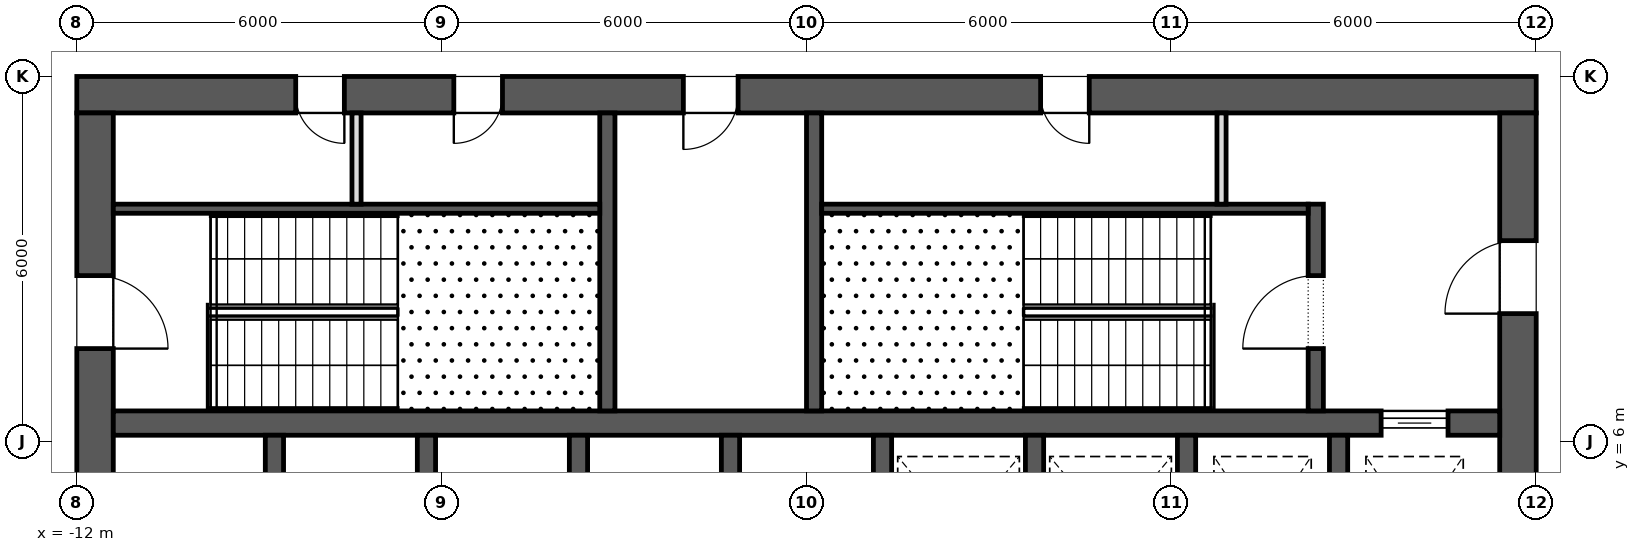
"""IFC4 building model, lengths in metres.
Left out: names, types, materials, properties, quantities, classifications, styles, units other than length and angle.
Written with IfcOpenShell. Run it as: python <this file> out.ifc"""

import sys

from ifc_helpers import new_model, si_unit, direction, frame, frame_2d, origin, place, context, subcontext, project, spatial, rectangle, extrude, element, fill, save


model = new_model("IFC4")
c1 = context("Model", 3, precision=1e-05, world=origin(), true_north=direction((0.0, 1.0)))
c2 = subcontext(c1, "Body", "Model", "MODEL_VIEW")
j1 = project(units=[si_unit("LENGTHUNIT", "METRE"), si_unit("PLANEANGLEUNIT", "RADIAN")], contexts=[c1])
p1 = place(None, origin())
s1 = spatial("IfcSite", under=j1, at=p1, CompositionType="ELEMENT")
p2 = place(p1, origin())
s2 = spatial("IfcBuilding", under=s1, at=p2, CompositionType="ELEMENT")
p3 = place(p2, frame((0.0, 0.0, 73.9)))
s3 = spatial("IfcBuildingStorey", under=s2, at=p3, CompositionType="ELEMENT", Elevation=73.9)
p4 = place(p3, frame((-12.0, 11.7, 0.0), z_axis=(0.0, 0.0, 1.0), x_axis=(1.0, 0.0, 0.0)))
e1 = element("IfcWall", 1, at=p4, inside=s3, PredefinedType="SHEAR", context=c2, shape_type="SweptSolid", body=[
    extrude(rectangle(XDim=24.0, YDim=0.6, at=frame_2d((12.0, 0.0))), origin(), (0.0, 0.0, 1.0), 4.2),
])
p5 = place(p4, frame((9.975, 0.0, 0.0)))
e2 = element("IfcOpeningElement", 2, at=p5, cuts=e1, PredefinedType="OPENING", context=c2, shape_type="SweptSolid", body=[
    extrude(rectangle(XDim=0.9, YDim=2.1, at=frame_2d((0.45, 1.05))), frame((0.0, 0.312, 0.0), z_axis=(0.0, -1.0, 0.0), x_axis=(1.0, 0.0, 0.0)), (0.0, 0.0, 1.0), 0.624),
])
p6 = place(p4, frame((3.6, 0.0, 0.0)))
e3 = element("IfcOpeningElement", 3, at=p6, cuts=e1, PredefinedType="OPENING", context=c2, shape_type="SweptSolid", body=[
    extrude(rectangle(XDim=0.8, YDim=2.1, at=frame_2d((0.4, 1.05))), frame((0.0, 0.312, 0.0), z_axis=(0.0, -1.0, 0.0), x_axis=(1.0, 0.0, 0.0)), (0.0, 0.0, 1.0), 0.624),
])
p7 = place(p4, frame((6.2, 0.0, 0.0)))
e4 = element("IfcOpeningElement", 4, at=p7, cuts=e1, PredefinedType="OPENING", context=c2, shape_type="SweptSolid", body=[
    extrude(rectangle(XDim=0.8, YDim=2.1, at=frame_2d((0.4, 1.05))), frame((0.0, 0.312, 0.0), z_axis=(0.0, -1.0, 0.0), x_axis=(1.0, 0.0, 0.0)), (0.0, 0.0, 1.0), 0.624),
])
p8 = place(p4, frame((15.85, 0.0, 0.0)))
e5 = element("IfcOpeningElement", 5, at=p8, cuts=e1, PredefinedType="OPENING", context=c2, shape_type="SweptSolid", body=[
    extrude(rectangle(XDim=0.8, YDim=2.1, at=frame_2d((0.4, 1.05))), frame((0.0, 0.312, 0.0), z_axis=(0.0, -1.0, 0.0), x_axis=(1.0, 0.0, 0.0)), (0.0, 0.0, 1.0), 0.624),
])
p9 = place(p3, frame((11.7, -11.4, 0.0), z_axis=(0.0, 0.0, 1.0), x_axis=(0.0, 1.0, 0.0)))
e6 = element("IfcWall", 6, at=p9, inside=s3, PredefinedType="SHEAR", context=c2, shape_type="SweptSolid", body=[
    extrude(rectangle(XDim=22.8, YDim=0.6, at=frame_2d((11.4, 0.0))), origin(), (0.0, 0.0, 1.0), 4.2),
])
p10 = place(p9, frame((10.2, 0.0, 0.0)))
e7 = element("IfcOpeningElement", 7, at=p10, cuts=e6, PredefinedType="OPENING", context=c2, shape_type="SweptSolid", body=[
    extrude(rectangle(XDim=2.4, YDim=2.1, at=frame_2d((1.2, 1.05))), frame((0.0, 0.312, 0.0), z_axis=(0.0, -1.0, 0.0), x_axis=(1.0, 0.0, 0.0)), (0.0, 0.0, 1.0), 0.624),
])
p11 = place(p9, frame((19.5, 0.0, 0.0)))
e8 = element("IfcOpeningElement", 8, at=p11, cuts=e6, PredefinedType="OPENING", context=c2, shape_type="SweptSolid", body=[
    extrude(rectangle(XDim=1.2, YDim=2.1, at=frame_2d((0.6, 1.05))), frame((0.0, 0.312, 0.0), z_axis=(0.0, -1.0, 0.0), x_axis=(1.0, 0.0, 0.0)), (0.0, 0.0, 1.0), 0.624),
])
p12 = place(p9, frame((2.1, 0.0, 0.0)))
e9 = element("IfcOpeningElement", 9, at=p12, cuts=e6, PredefinedType="OPENING", context=c2, shape_type="SweptSolid", body=[
    extrude(rectangle(XDim=1.2, YDim=2.1, at=frame_2d((0.6, 1.05))), frame((0.0, 0.312, 0.0), z_axis=(0.0, -1.0, 0.0), x_axis=(1.0, 0.0, 0.0)), (0.0, 0.0, 1.0), 0.624),
])
p13 = place(p3, frame((-11.7, -11.4, 0.0), z_axis=(0.0, 0.0, 1.0), x_axis=(0.0, 1.0, 0.0)))
e10 = element("IfcWall", 10, at=p13, inside=s3, PredefinedType="SHEAR", context=c2, shape_type="SweptSolid", body=[
    extrude(rectangle(XDim=22.8, YDim=0.6, at=frame_2d((11.4, 0.0))), origin(), (0.0, 0.0, 1.0), 4.2),
])
p14 = place(p13, frame((10.2, 0.0, 0.0)))
e11 = element("IfcOpeningElement", 11, at=p14, cuts=e10, PredefinedType="OPENING", context=c2, shape_type="SweptSolid", body=[
    extrude(rectangle(XDim=2.4, YDim=2.1, at=frame_2d((1.2, 1.05))), frame((0.0, 0.312, 0.0), z_axis=(0.0, -1.0, 0.0), x_axis=(1.0, 0.0, 0.0)), (0.0, 0.0, 1.0), 0.624),
])
p15 = place(p13, frame((18.925, 0.0, 0.0)))
e12 = element("IfcOpeningElement", 12, at=p15, cuts=e10, PredefinedType="OPENING", context=c2, shape_type="SweptSolid", body=[
    extrude(rectangle(XDim=1.2, YDim=2.1, at=frame_2d((0.6, 1.05))), frame((0.0, 0.312, 0.0), z_axis=(0.0, -1.0, 0.0), x_axis=(1.0, 0.0, 0.0)), (0.0, 0.0, 1.0), 0.624),
])
p16 = place(p13, frame((2.675, 0.0, 0.0)))
e13 = element("IfcOpeningElement", 13, at=p16, cuts=e10, PredefinedType="OPENING", context=c2, shape_type="SweptSolid", body=[
    extrude(rectangle(XDim=1.2, YDim=2.1, at=frame_2d((0.6, 1.05))), frame((0.0, 0.312, 0.0), z_axis=(0.0, -1.0, 0.0), x_axis=(1.0, 0.0, 0.0)), (0.0, 0.0, 1.0), 0.624),
])
p17 = place(p3, frame((-11.4, 6.3, 0.0), z_axis=(0.0, 0.0, 1.0), x_axis=(1.0, 0.0, 0.0)))
e14 = element("IfcWall", 14, at=p17, inside=s3, PredefinedType="SHEAR", context=c2, shape_type="SweptSolid", body=[
    extrude(rectangle(XDim=22.8, YDim=0.4, at=frame_2d((11.4, 0.0))), origin(), (0.0, 0.0, 1.0), 4.2),
])
p18 = place(p17, frame((20.85, 0.0, 0.0)))
e15 = element("IfcOpeningElement", 15, at=p18, cuts=e14, PredefinedType="OPENING", context=c2, shape_type="SweptSolid", body=[
    extrude(rectangle(XDim=1.1, YDim=2.1, at=frame_2d((0.55, 1.05))), frame((0.0, 0.212, 0.0), z_axis=(0.0, -1.0, 0.0), x_axis=(1.0, 0.0, 0.0)), (0.0, 0.0, 1.0), 0.424),
])
for number, where, z_axis, x_axis in (
    (16, (-8.75, 3.2, 0.0), (0.0, 0.0, 1.0), (0.0, 1.0, 0.0)),
    (17, (-6.25, 3.2, 0.0), (0.0, 0.0, 1.0), (0.0, 1.0, 0.0)),
    (18, (-3.75, 3.2, 0.0), (0.0, 0.0, 1.0), (0.0, 1.0, 0.0)),
    (19, (-1.25, 3.2, 0.0), (0.0, 0.0, 1.0), (0.0, 1.0, 0.0)),
    (20, (1.25, 3.2, 0.0), (0.0, 0.0, 1.0), (0.0, 1.0, 0.0)),
    (21, (3.75, 3.2, 0.0), (0.0, 0.0, 1.0), (0.0, 1.0, 0.0)),
    (22, (6.25, 3.2, 0.0), (0.0, 0.0, 1.0), (0.0, 1.0, 0.0)),
    (23, (8.75, 3.2, 0.0), (0.0, 0.0, 1.0), (0.0, 1.0, 0.0)),
):
    element("IfcWall", number, at=place(p3, frame(where, z_axis=z_axis, x_axis=x_axis)), inside=s3, PredefinedType="SHEAR", context=c2, shape_type="SweptSolid", body=[
        extrude(rectangle(XDim=2.9, YDim=0.3, at=frame_2d((1.45, 0.0))), origin(), (0.0, 0.0, 1.0), 4.2),
    ])
for number, where, z_axis, x_axis in (
    (24, (-3.275, 6.5, 0.0), (0.0, 0.0, 1.0), (0.0, 1.0, 0.0)),
    (25, (0.125, 6.5, 0.0), (0.0, 0.0, 1.0), (0.0, 1.0, 0.0)),
):
    element("IfcWall", number, at=place(p3, frame(where, z_axis=z_axis, x_axis=x_axis)), inside=s3, PredefinedType="SHEAR", context=c2, shape_type="SweptSolid", body=[
        extrude(rectangle(XDim=4.9, YDim=0.25, at=frame_2d((2.45, 0.0))), origin(), (0.0, 0.0, 1.0), 3.9),
    ])
p19 = place(p3, frame((8.375, 6.5, 0.0), z_axis=(0.0, 0.0, 1.0), x_axis=(0.0, 1.0, 0.0)))
e26 = element("IfcWall", 26, at=p19, inside=s3, PredefinedType="SHEAR", context=c2, shape_type="SweptSolid", body=[
    extrude(rectangle(XDim=3.4, YDim=0.25, at=frame_2d((1.7, 0.0))), origin(), (0.0, 0.0, 1.0), 3.9),
])
p20 = place(p19, frame((1.025, 0.0, 0.0)))
e27 = element("IfcOpeningElement", 27, at=p20, cuts=e26, PredefinedType="OPENING", context=c2, shape_type="SweptSolid", body=[
    extrude(rectangle(XDim=1.2, YDim=2.1, at=frame_2d((0.6, 1.05))), frame((0.0, 0.137, 0.0), z_axis=(0.0, -1.0, 0.0), x_axis=(1.0, 0.0, 0.0)), (0.0, 0.0, 1.0), 0.274),
])
for number, where, z_axis, x_axis in (
    (28, (-11.4, 9.825, 0.0), (0.0, 0.0, 1.0), (1.0, 0.0, 0.0)),
    (29, (0.25, 9.825, 0.0), (0.0, 0.0, 1.0), (1.0, 0.0, 0.0)),
):
    element("IfcWall", number, at=place(p3, frame(where, z_axis=z_axis, x_axis=x_axis)), inside=s3, PredefinedType="SHEAR", context=c2, shape_type="SweptSolid", body=[
        extrude(rectangle(XDim=8.0, YDim=0.15, at=frame_2d((4.0, 0.0))), origin(), (0.0, 0.0, 1.0), 3.9),
    ])
for number, where, z_axis, x_axis in (
    (30, (-7.4, 9.9, 0.0), (0.0, 0.0, 1.0), (0.0, 1.0, 0.0)),
    (31, (6.825, 9.9, 0.0), (0.0, 0.0, 1.0), (0.0, 1.0, 0.0)),
):
    element("IfcWall", number, at=place(p3, frame(where, z_axis=z_axis, x_axis=x_axis)), inside=s3, PredefinedType="PARTITIONING", context=c2, shape_type="SweptSolid", body=[
        extrude(rectangle(XDim=1.5, YDim=0.15, at=frame_2d((0.75, 0.0))), origin(), (0.0, 0.0, 1.0), 3.9),
    ])
p21 = place(p18, origin())
e32 = element("IfcDoor", 32, at=p21, inside=s3, OperationType="SLIDING_TO_LEFT", PredefinedType="DOOR", context=c2, shape_type="SweptSolid", body=[
    extrude(rectangle(XDim=1.1, YDim=2.1, at=frame_2d((0.55, 1.05))), frame((0.0, 0.025, 0.0), z_axis=(0.0, -1.0, 0.0), x_axis=(1.0, 0.0, 0.0)), (0.0, 0.0, 1.0), 0.05),
])
fill(e15, e32)
p22 = place(p15, frame((1.2, 0.0, 0.0), z_axis=(0.0, 0.0, 1.0), x_axis=(-1.0, 0.0, 0.0)))
e33 = element("IfcDoor", 33, at=p22, inside=s3, OperationType="SINGLE_SWING_LEFT", PredefinedType="DOOR", context=c2, shape_type="SweptSolid", body=[
    extrude(rectangle(XDim=1.2, YDim=2.1, at=frame_2d((0.6, 1.05))), frame((0.0, 0.025, 0.0), z_axis=(0.0, -1.0, 0.0), x_axis=(1.0, 0.0, 0.0)), (0.0, 0.0, 1.0), 0.05),
])
fill(e12, e33)
p23 = place(p20, origin())
e34 = element("IfcDoor", 34, at=p23, inside=s3, OperationType="SINGLE_SWING_RIGHT", PredefinedType="DOOR", context=c2, shape_type="SweptSolid", body=[
    extrude(rectangle(XDim=1.2, YDim=2.1, at=frame_2d((0.6, 1.05))), frame((0.0, 0.025, 0.0), z_axis=(0.0, -1.0, 0.0), x_axis=(1.0, 0.0, 0.0)), (0.0, 0.0, 1.0), 0.05),
])
fill(e27, e34)
p24 = place(p11, origin())
e35 = element("IfcDoor", 35, at=p24, inside=s3, OperationType="SINGLE_SWING_RIGHT", PredefinedType="DOOR", context=c2, shape_type="SweptSolid", body=[
    extrude(rectangle(XDim=1.2, YDim=2.1, at=frame_2d((0.6, 1.05))), frame((0.0, 0.025, 0.0), z_axis=(0.0, -1.0, 0.0), x_axis=(1.0, 0.0, 0.0)), (0.0, 0.0, 1.0), 0.05),
])
fill(e8, e35)
p25 = place(p5, frame((0.9, 0.0, 0.0), z_axis=(0.0, 0.0, 1.0), x_axis=(-1.0, 0.0, 0.0)))
e36 = element("IfcDoor", 36, at=p25, inside=s3, OperationType="SINGLE_SWING_LEFT", PredefinedType="DOOR", context=c2, shape_type="SweptSolid", body=[
    extrude(rectangle(XDim=0.9, YDim=2.1, at=frame_2d((0.45, 1.05))), frame((0.0, 0.025, 0.0), z_axis=(0.0, -1.0, 0.0), x_axis=(1.0, 0.0, 0.0)), (0.0, 0.0, 1.0), 0.05),
])
fill(e2, e36)
p26 = place(p6, frame((0.8, 0.0, 0.0), z_axis=(0.0, 0.0, 1.0), x_axis=(-1.0, 0.0, 0.0)))
e37 = element("IfcDoor", 37, at=p26, inside=s3, OperationType="SINGLE_SWING_RIGHT", PredefinedType="DOOR", context=c2, shape_type="SweptSolid", body=[
    extrude(rectangle(XDim=0.8, YDim=2.1, at=frame_2d((0.4, 1.05))), frame((0.0, 0.025, 0.0), z_axis=(0.0, -1.0, 0.0), x_axis=(1.0, 0.0, 0.0)), (0.0, 0.0, 1.0), 0.05),
])
fill(e3, e37)
p27 = place(p7, frame((0.8, 0.0, 0.0), z_axis=(0.0, 0.0, 1.0), x_axis=(-1.0, 0.0, 0.0)))
e38 = element("IfcDoor", 38, at=p27, inside=s3, OperationType="SINGLE_SWING_LEFT", PredefinedType="DOOR", context=c2, shape_type="SweptSolid", body=[
    extrude(rectangle(XDim=0.8, YDim=2.1, at=frame_2d((0.4, 1.05))), frame((0.0, 0.025, 0.0), z_axis=(0.0, -1.0, 0.0), x_axis=(1.0, 0.0, 0.0)), (0.0, 0.0, 1.0), 0.05),
])
fill(e4, e38)
p28 = place(p8, frame((0.8, 0.0, 0.0), z_axis=(0.0, 0.0, 1.0), x_axis=(-1.0, 0.0, 0.0)))
e39 = element("IfcDoor", 39, at=p28, inside=s3, OperationType="SINGLE_SWING_RIGHT", PredefinedType="DOOR", context=c2, shape_type="SweptSolid", body=[
    extrude(rectangle(XDim=0.8, YDim=2.1, at=frame_2d((0.4, 1.05))), frame((0.0, 0.025, 0.0), z_axis=(0.0, -1.0, 0.0), x_axis=(1.0, 0.0, 0.0)), (0.0, 0.0, 1.0), 0.05),
])
fill(e5, e39)
save(model, sys.argv[1])
